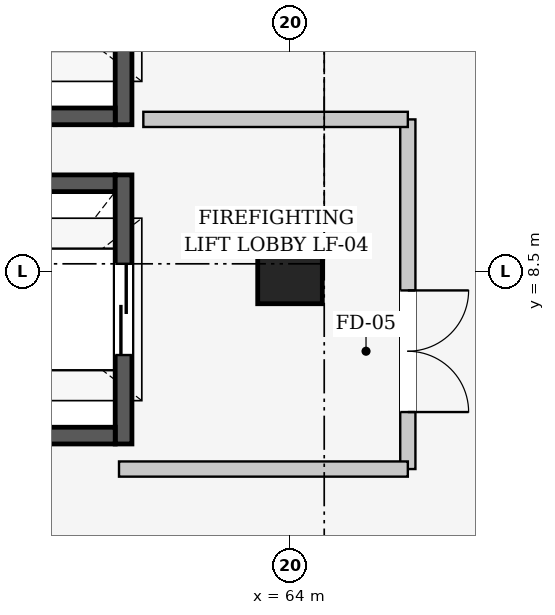
"""IFC4 building model, lengths in metres.
Left out: names, types, materials, properties, quantities, classifications, styles, units other than length and angle.
Written with IfcOpenShell. Run it as: python <this file> out.ifc"""

import sys

from ifc_helpers import new_model, si_unit, direction, frame, frame_2d, origin, origin_2d, place, context, subcontext, project, spatial, rectangle, extrude, element, fill, save


model = new_model("IFC4")
c1 = context("Model", 3, precision=1e-05, world=origin(), true_north=direction((0.0, 1.0)))
c2 = subcontext(c1, "Body", "Model", "MODEL_VIEW")
j1 = project(units=[si_unit("LENGTHUNIT", "METRE"), si_unit("PLANEANGLEUNIT", "RADIAN")], contexts=[c1])
p1 = place(None, origin())
s1 = spatial("IfcSite", under=j1, at=p1, CompositionType="ELEMENT")
p2 = place(p1, origin())
s2 = spatial("IfcBuilding", under=s1, at=p2, CompositionType="ELEMENT")
p3 = place(p2, frame((0.0, 0.0, 16.2)))
s3 = spatial("IfcBuildingStorey", under=s2, at=p3, CompositionType="ELEMENT", Elevation=16.2)
p4 = place(p3, frame((64.0, 8.5, 0.0), z_axis=(0.0, 0.0, 1.0), x_axis=(1.0, 0.0, 0.0)))
e1 = element("IfcColumn", 1, at=p4, inside=s3, PredefinedType="COLUMN", context=c2, shape_type="SweptSolid", body=[
    extrude(rectangle(XDim=0.85, YDim=0.85, at=origin_2d()), origin(), (0.0, 0.0, 1.0), 4.8),
])
p5 = place(p3, frame((59.3, 9.66, 0.0), z_axis=(0.0, 0.0, 1.0), x_axis=(1.0, 0.0, 0.0)))
e2 = element("IfcWall", 2, at=p5, inside=s3, PredefinedType="SHEAR", context=c2, shape_type="SweptSolid", body=[
    extrude(rectangle(XDim=2.4, YDim=0.22, at=frame_2d((1.2, 0.0))), origin(), (0.0, 0.0, 1.0), 4.8),
])
p6 = place(p3, frame((61.81, 9.77, 0.0), z_axis=(0.0, 0.0, 1.0), x_axis=(0.0, -1.0, 0.0)))
e3 = element("IfcWall", 3, at=p6, inside=s3, PredefinedType="SHEAR", context=c2, shape_type="SweptSolid", body=[
    extrude(rectangle(XDim=3.54, YDim=0.22, at=frame_2d((1.77, 0.0))), origin(), (0.0, 0.0, 1.0), 4.8),
])
p7 = place(p6, frame((1.17, 0.0, 0.0)))
e4 = element("IfcOpeningElement", 4, at=p7, cuts=e3, PredefinedType="OPENING", context=c2, shape_type="SweptSolid", body=[
    extrude(rectangle(XDim=1.2, YDim=2.2, at=frame_2d((0.6, 1.1))), frame((0.0, 0.12, 0.0), z_axis=(0.0, -1.0, 0.0), x_axis=(1.0, 0.0, 0.0)), (0.0, 0.0, 1.0), 0.24),
])
p8 = place(p3, frame((61.7, 6.34, 0.0), z_axis=(0.0, 0.0, 1.0), x_axis=(-1.0, 0.0, 0.0)))
e5 = element("IfcWall", 5, at=p8, inside=s3, PredefinedType="SHEAR", context=c2, shape_type="SweptSolid", body=[
    extrude(rectangle(XDim=2.4, YDim=0.22, at=frame_2d((1.2, 0.0))), origin(), (0.0, 0.0, 1.0), 4.8),
])
p9 = place(p3, frame((61.81, 13.97, 0.0), z_axis=(0.0, 0.0, 1.0), x_axis=(0.0, -1.0, 0.0)))
e6 = element("IfcWall", 6, at=p9, inside=s3, PredefinedType="SHEAR", context=c2, shape_type="SweptSolid", body=[
    extrude(rectangle(XDim=3.54, YDim=0.22, at=frame_2d((1.77, 0.0))), origin(), (0.0, 0.0, 1.0), 4.8),
])
p10 = place(p9, frame((1.22, 0.0, 0.0)))
e7 = element("IfcOpeningElement", 7, at=p10, cuts=e6, PredefinedType="OPENING", context=c2, shape_type="SweptSolid", body=[
    extrude(rectangle(XDim=1.1, YDim=2.2, at=frame_2d((0.55, 1.1))), frame((0.0, 0.12, 0.0), z_axis=(0.0, -1.0, 0.0), x_axis=(1.0, 0.0, 0.0)), (0.0, 0.0, 1.0), 0.24),
])
p11 = place(p3, frame((61.7, 10.54, 0.0), z_axis=(0.0, 0.0, 1.0), x_axis=(-1.0, 0.0, 0.0)))
e8 = element("IfcWall", 8, at=p11, inside=s3, PredefinedType="SHEAR", context=c2, shape_type="SweptSolid", body=[
    extrude(rectangle(XDim=2.4, YDim=0.22, at=frame_2d((1.2, 0.0))), origin(), (0.0, 0.0, 1.0), 4.8),
])
p12 = place(p3, frame((65.55, 10.5, 0.0), z_axis=(0.0, 0.0, 1.0), x_axis=(0.0, -1.0, 0.0)))
e9 = element("IfcWall", 9, at=p12, inside=s3, PredefinedType="PARTITIONING", context=c2, shape_type="SweptSolid", body=[
    extrude(rectangle(XDim=4.6, YDim=0.2, at=frame_2d((2.3, 0.0))), origin(), (0.0, 0.0, 1.0), 3.545),
])
p13 = place(p12, frame((2.25, 0.0, 0.0)))
e10 = element("IfcOpeningElement", 10, at=p13, cuts=e9, PredefinedType="OPENING", context=c2, shape_type="SweptSolid", body=[
    extrude(rectangle(XDim=1.6, YDim=2.2, at=frame_2d((0.8, 1.1))), frame((0.0, 0.11, 0.0), z_axis=(0.0, -1.0, 0.0), x_axis=(1.0, 0.0, 0.0)), (0.0, 0.0, 1.0), 0.22),
])
p14 = place(p3, frame((62.07, 10.5, 0.0), z_axis=(0.0, 0.0, 1.0), x_axis=(1.0, 0.0, 0.0)))
e11 = element("IfcWall", 11, at=p14, inside=s3, PredefinedType="PARTITIONING", context=c2, shape_type="SweptSolid", body=[
    extrude(rectangle(XDim=3.48, YDim=0.2, at=frame_2d((1.74, 0.0))), origin(), (0.0, 0.0, 1.0), 3.845),
])
p15 = place(p3, frame((65.55, 5.9, 0.0), z_axis=(0.0, 0.0, 1.0), x_axis=(-1.0, 0.0, 0.0)))
e12 = element("IfcWall", 12, at=p15, inside=s3, PredefinedType="PARTITIONING", context=c2, shape_type="SweptSolid", body=[
    extrude(rectangle(XDim=3.8, YDim=0.2, at=frame_2d((1.9, 0.0))), origin(), (0.0, 0.0, 1.0), 3.845),
])
p16 = place(p7, origin())
e13 = element("IfcDoor", 13, at=p16, inside=s3, OperationType="SLIDING_TO_LEFT", PredefinedType="DOOR", context=c2, shape_type="SweptSolid", body=[
    extrude(rectangle(XDim=1.2, YDim=2.2, at=frame_2d((0.6, 1.1))), frame((0.0, 0.025, 0.0), z_axis=(0.0, -1.0, 0.0), x_axis=(1.0, 0.0, 0.0)), (0.0, 0.0, 1.0), 0.05),
])
fill(e4, e13)
p17 = place(p13, origin())
e14 = element("IfcDoor", 14, at=p17, inside=s3, OperationType="DOUBLE_DOOR_SINGLE_SWING", PredefinedType="DOOR", context=c2, shape_type="SweptSolid", body=[
    extrude(rectangle(XDim=1.6, YDim=2.2, at=frame_2d((0.8, 1.1))), frame((0.0, 0.025, 0.0), z_axis=(0.0, -1.0, 0.0), x_axis=(1.0, 0.0, 0.0)), (0.0, 0.0, 1.0), 0.05),
])
fill(e10, e14)
save(model, sys.argv[1])
